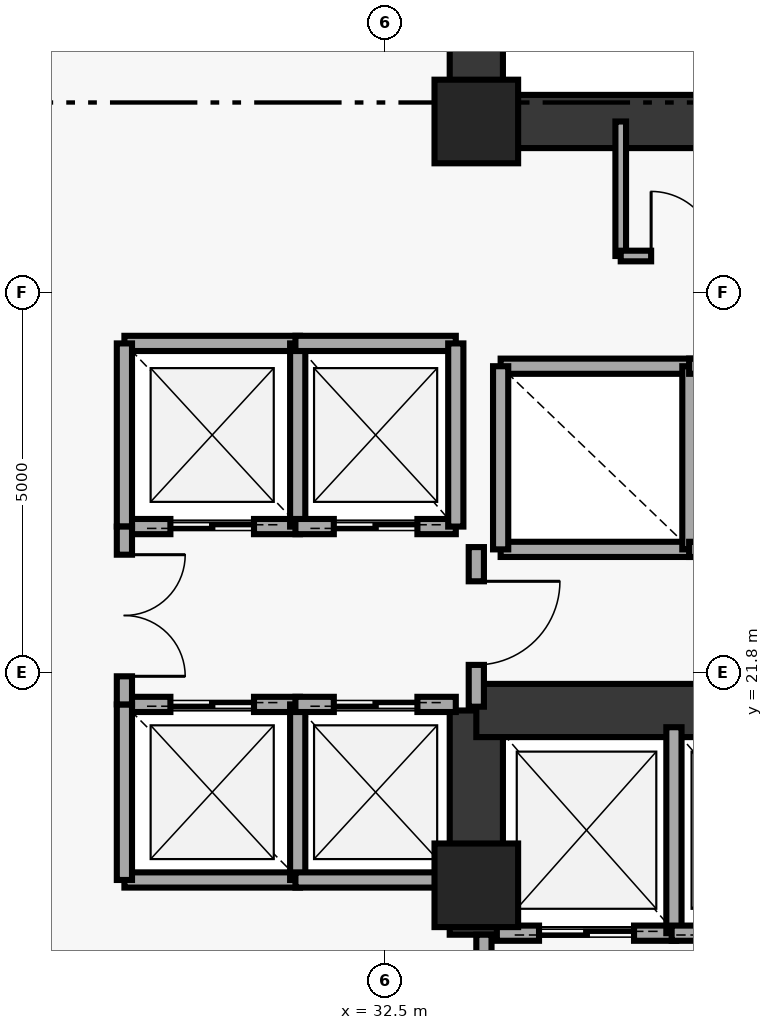
"""IFC4 building model, lengths in metres.
Left out: names, types, materials, properties, quantities, classifications, styles, units other than length and angle.
Written with IfcOpenShell. Run it as: python <this file> out.ifc"""

import sys

from ifc_helpers import new_model, si_unit, direction, frame, frame_2d, origin, origin_2d, place, context, subcontext, project, spatial, rectangle, extrude, element, fill, save


model = new_model("IFC4")
c1 = context("Model", 3, precision=1e-05, world=origin(), true_north=direction((0.0, 1.0)))
c2 = subcontext(c1, "Body", "Model", "MODEL_VIEW")
j1 = project(units=[si_unit("LENGTHUNIT", "METRE"), si_unit("PLANEANGLEUNIT", "RADIAN")], contexts=[c1])
p1 = place(None, origin())
s1 = spatial("IfcSite", under=j1, at=p1, CompositionType="ELEMENT")
p2 = place(p1, origin())
s2 = spatial("IfcBuilding", under=s1, at=p2, CompositionType="ELEMENT")
p3 = place(p2, frame((0.0, 0.0, 65.55)))
s3 = spatial("IfcBuildingStorey", under=s2, at=p3, CompositionType="ELEMENT", Elevation=65.55)
for number, where, z_axis, x_axis in (
    (1, (33.7, 19.0, 0.0), (0.0, 0.0, 1.0), (1.0, 0.0, 0.0)),
    (2, (33.7, 29.05, 0.0), (0.0, 0.0, 1.0), (1.0, 0.0, 0.0)),
):
    element("IfcColumn", number, at=place(p3, frame(where, z_axis=z_axis, x_axis=x_axis)), inside=s3, PredefinedType="PILASTER", context=c2, shape_type="SweptSolid", body=[
        extrude(rectangle(XDim=1.1, YDim=1.1, at=origin_2d()), origin(), (0.0, 0.0, 1.0), 3.8),
    ])
p4 = place(p3, frame((33.7, 29.05, 0.0), z_axis=(0.0, 0.0, 1.0), x_axis=(0.0, 1.0, 0.0)))
e3 = element("IfcWall", 3, at=p4, inside=s3, PredefinedType="SHEAR", context=c2, shape_type="SweptSolid", body=[
    extrude(rectangle(XDim=8.35, YDim=0.7, at=frame_2d((4.175, 0.0))), origin(), (0.0, 0.0, 1.0), 3.8),
])
p5 = place(p3, frame((33.7, 18.35, 0.0), z_axis=(0.0, 0.0, 1.0), x_axis=(0.0, 1.0, 0.0)))
e4 = element("IfcWall", 4, at=p5, inside=s3, PredefinedType="SHEAR", context=c2, shape_type="SweptSolid", body=[
    extrude(rectangle(XDim=2.95, YDim=0.7, at=frame_2d((1.475, 0.0))), origin(), (0.0, 0.0, 1.0), 3.8),
])
p6 = place(p3, frame((33.7, 29.05, 0.0), z_axis=(0.0, 0.0, 1.0), x_axis=(1.0, 0.0, 0.0)))
e5 = element("IfcWall", 5, at=p6, inside=s3, PredefinedType="SHEAR", context=c2, shape_type="SweptSolid", body=[
    extrude(rectangle(XDim=10.6, YDim=0.7, at=frame_2d((5.3, 0.0))), origin(), (0.0, 0.0, 1.0), 3.8),
])
p7 = place(p3, frame((33.7, 21.3, 0.0), z_axis=(0.0, 0.0, 1.0), x_axis=(1.0, 0.0, 0.0)))
e6 = element("IfcWall", 6, at=p7, inside=s3, PredefinedType="SHEAR", context=c2, shape_type="SweptSolid", body=[
    extrude(rectangle(XDim=7.55, YDim=0.7, at=frame_2d((3.775, 0.0))), origin(), (0.0, 0.0, 1.0), 3.8),
])
p8 = place(p3, frame((35.6, 27.28, 0.0), z_axis=(0.0, 0.0, 1.0), x_axis=(0.0, 1.0, 0.0)))
e7 = element("IfcWall", 7, at=p8, inside=s3, PredefinedType="PARTITIONING", context=c2, shape_type="SweptSolid", body=[
    extrude(rectangle(XDim=1.77, YDim=0.14, at=frame_2d((0.885, 0.0))), origin(), (0.0, 0.0, 1.0), 3.8),
])
p9 = place(p3, frame((29.07, 23.72, 0.0), z_axis=(0.0, 0.0, 1.0), x_axis=(1.0, 0.0, 0.0)))
e8 = element("IfcWall", 8, at=p9, inside=s3, PredefinedType="SOLIDWALL", context=c2, shape_type="SweptSolid", body=[
    extrude(rectangle(XDim=2.31, YDim=0.2, at=frame_2d((1.155, 0.0))), origin(), (0.0, 0.0, 1.0), 3.8),
])
p10 = place(p9, frame((0.605, 0.0, 0.0)))
e9 = element("IfcOpeningElement", 9, at=p10, cuts=e8, PredefinedType="OPENING", context=c2, shape_type="SweptSolid", body=[
    extrude(rectangle(XDim=1.1, YDim=2.15, at=frame_2d((0.55, 1.075))), frame((0.0, 0.11, 0.0), z_axis=(0.0, -1.0, 0.0), x_axis=(1.0, 0.0, 0.0)), (0.0, 0.0, 1.0), 0.22),
])
p11 = place(p3, frame((29.07, 26.13, 0.0), z_axis=(0.0, 0.0, 1.0), x_axis=(1.0, 0.0, 0.0)))
e10 = element("IfcWall", 10, at=p11, inside=s3, PredefinedType="SOLIDWALL", context=c2, shape_type="SweptSolid", body=[
    extrude(rectangle(XDim=2.31, YDim=0.2, at=frame_2d((1.155, 0.0))), origin(), (0.0, 0.0, 1.0), 3.8),
])
for number, where, z_axis, x_axis in (
    (11, (29.07, 23.72, 0.0), (0.0, 0.0, 1.0), (0.0, 1.0, 0.0)),
    (12, (31.35, 23.72, 0.0), (0.0, 0.0, 1.0), (0.0, 1.0, 0.0)),
):
    element("IfcWall", number, at=place(p3, frame(where, z_axis=z_axis, x_axis=x_axis)), inside=s3, PredefinedType="SOLIDWALL", context=c2, shape_type="SweptSolid", body=[
        extrude(rectangle(XDim=2.41, YDim=0.2, at=frame_2d((1.205, 0.0))), origin(), (0.0, 0.0, 1.0), 3.8),
    ])
p12 = place(p3, frame((31.32, 23.72, 0.0), z_axis=(0.0, 0.0, 1.0), x_axis=(1.0, 0.0, 0.0)))
e13 = element("IfcWall", 13, at=p12, inside=s3, PredefinedType="SOLIDWALL", context=c2, shape_type="SweptSolid", body=[
    extrude(rectangle(XDim=2.11, YDim=0.2, at=frame_2d((1.055, 0.0))), origin(), (0.0, 0.0, 1.0), 3.8),
])
p13 = place(p12, frame((0.505, 0.0, 0.0)))
e14 = element("IfcOpeningElement", 14, at=p13, cuts=e13, PredefinedType="OPENING", context=c2, shape_type="SweptSolid", body=[
    extrude(rectangle(XDim=1.1, YDim=2.15, at=frame_2d((0.55, 1.075))), frame((0.0, 0.11, 0.0), z_axis=(0.0, -1.0, 0.0), x_axis=(1.0, 0.0, 0.0)), (0.0, 0.0, 1.0), 0.22),
])
p14 = place(p3, frame((31.32, 26.13, 0.0), z_axis=(0.0, 0.0, 1.0), x_axis=(1.0, 0.0, 0.0)))
e15 = element("IfcWall", 15, at=p14, inside=s3, PredefinedType="SOLIDWALL", context=c2, shape_type="SweptSolid", body=[
    extrude(rectangle(XDim=2.11, YDim=0.2, at=frame_2d((1.055, 0.0))), origin(), (0.0, 0.0, 1.0), 3.8),
])
p15 = place(p3, frame((33.43, 23.72, 0.0), z_axis=(0.0, 0.0, 1.0), x_axis=(0.0, 1.0, 0.0)))
e16 = element("IfcWall", 16, at=p15, inside=s3, PredefinedType="SOLIDWALL", context=c2, shape_type="SweptSolid", body=[
    extrude(rectangle(XDim=2.41, YDim=0.2, at=frame_2d((1.205, 0.0))), origin(), (0.0, 0.0, 1.0), 3.8),
])
p16 = place(p3, frame((29.07, 19.07, 0.0), z_axis=(0.0, 0.0, 1.0), x_axis=(1.0, 0.0, 0.0)))
e17 = element("IfcWall", 17, at=p16, inside=s3, PredefinedType="SOLIDWALL", context=c2, shape_type="SweptSolid", body=[
    extrude(rectangle(XDim=2.31, YDim=0.2, at=frame_2d((1.155, 0.0))), origin(), (0.0, 0.0, 1.0), 3.8),
])
p17 = place(p3, frame((29.07, 21.38, 0.0), z_axis=(0.0, 0.0, 1.0), x_axis=(1.0, 0.0, 0.0)))
e18 = element("IfcWall", 18, at=p17, inside=s3, PredefinedType="SOLIDWALL", context=c2, shape_type="SweptSolid", body=[
    extrude(rectangle(XDim=2.31, YDim=0.2, at=frame_2d((1.155, 0.0))), origin(), (0.0, 0.0, 1.0), 3.8),
])
p18 = place(p17, frame((0.605, 0.0, 0.0)))
e19 = element("IfcOpeningElement", 19, at=p18, cuts=e18, PredefinedType="OPENING", context=c2, shape_type="SweptSolid", body=[
    extrude(rectangle(XDim=1.1, YDim=2.15, at=frame_2d((0.55, 1.075))), frame((0.0, 0.11, 0.0), z_axis=(0.0, -1.0, 0.0), x_axis=(1.0, 0.0, 0.0)), (0.0, 0.0, 1.0), 0.22),
])
for number, where, z_axis, x_axis in (
    (20, (29.07, 19.07, 0.0), (0.0, 0.0, 1.0), (0.0, 1.0, 0.0)),
    (21, (31.35, 19.07, 0.0), (0.0, 0.0, 1.0), (0.0, 1.0, 0.0)),
):
    element("IfcWall", number, at=place(p3, frame(where, z_axis=z_axis, x_axis=x_axis)), inside=s3, PredefinedType="SOLIDWALL", context=c2, shape_type="SweptSolid", body=[
        extrude(rectangle(XDim=2.31, YDim=0.2, at=frame_2d((1.155, 0.0))), origin(), (0.0, 0.0, 1.0), 3.8),
    ])
p19 = place(p3, frame((31.32, 19.07, 0.0), z_axis=(0.0, 0.0, 1.0), x_axis=(1.0, 0.0, 0.0)))
e22 = element("IfcWall", 22, at=p19, inside=s3, PredefinedType="SOLIDWALL", context=c2, shape_type="SweptSolid", body=[
    extrude(rectangle(XDim=2.11, YDim=0.2, at=frame_2d((1.055, 0.0))), origin(), (0.0, 0.0, 1.0), 3.8),
])
p20 = place(p3, frame((31.32, 21.38, 0.0), z_axis=(0.0, 0.0, 1.0), x_axis=(1.0, 0.0, 0.0)))
e23 = element("IfcWall", 23, at=p20, inside=s3, PredefinedType="SOLIDWALL", context=c2, shape_type="SweptSolid", body=[
    extrude(rectangle(XDim=2.11, YDim=0.2, at=frame_2d((1.055, 0.0))), origin(), (0.0, 0.0, 1.0), 3.8),
])
p21 = place(p20, frame((0.505, 0.0, 0.0)))
e24 = element("IfcOpeningElement", 24, at=p21, cuts=e23, PredefinedType="OPENING", context=c2, shape_type="SweptSolid", body=[
    extrude(rectangle(XDim=1.1, YDim=2.15, at=frame_2d((0.55, 1.075))), frame((0.0, 0.11, 0.0), z_axis=(0.0, -1.0, 0.0), x_axis=(1.0, 0.0, 0.0)), (0.0, 0.0, 1.0), 0.22),
])
for number, where, z_axis, x_axis in (
    (25, (34.02, 23.42, 0.0), (0.0, 0.0, 1.0), (1.0, 0.0, 0.0)),
    (26, (34.02, 25.83, 0.0), (0.0, 0.0, 1.0), (1.0, 0.0, 0.0)),
):
    element("IfcWall", number, at=place(p3, frame(where, z_axis=z_axis, x_axis=x_axis)), inside=s3, PredefinedType="SOLIDWALL", context=c2, shape_type="SweptSolid", body=[
        extrude(rectangle(XDim=2.5, YDim=0.2, at=frame_2d((1.25, 0.0))), origin(), (0.0, 0.0, 1.0), 3.8),
    ])
for number, where, z_axis, x_axis in (
    (27, (34.02, 23.42, 0.0), (0.0, 0.0, 1.0), (0.0, 1.0, 0.0)),
    (28, (36.51, 23.42, 0.0), (0.0, 0.0, 1.0), (0.0, 1.0, 0.0)),
):
    element("IfcWall", number, at=place(p3, frame(where, z_axis=z_axis, x_axis=x_axis)), inside=s3, PredefinedType="SOLIDWALL", context=c2, shape_type="SweptSolid", body=[
        extrude(rectangle(XDim=2.41, YDim=0.2, at=frame_2d((1.205, 0.0))), origin(), (0.0, 0.0, 1.0), 3.8),
    ])
for number, where, z_axis, x_axis in (
    (29, (36.5, 23.42, 0.0), (0.0, 0.0, 1.0), (1.0, 0.0, 0.0)),
    (30, (36.5, 25.83, 0.0), (0.0, 0.0, 1.0), (1.0, 0.0, 0.0)),
):
    element("IfcWall", number, at=place(p3, frame(where, z_axis=z_axis, x_axis=x_axis)), inside=s3, PredefinedType="SOLIDWALL", context=c2, shape_type="SweptSolid", body=[
        extrude(rectangle(XDim=2.5, YDim=0.2, at=frame_2d((1.25, 0.0))), origin(), (0.0, 0.0, 1.0), 3.8),
    ])
p22 = place(p3, frame((33.97, 18.37, 0.0), z_axis=(0.0, 0.0, 1.0), x_axis=(1.0, 0.0, 0.0)))
e31 = element("IfcWall", 31, at=p22, inside=s3, PredefinedType="SOLIDWALL", context=c2, shape_type="SweptSolid", body=[
    extrude(rectangle(XDim=2.36, YDim=0.2, at=frame_2d((1.18, 0.0))), origin(), (0.0, 0.0, 1.0), 3.8),
])
p23 = place(p22, frame((0.555, 0.0, 0.0)))
e32 = element("IfcOpeningElement", 32, at=p23, cuts=e31, PredefinedType="OPENING", context=c2, shape_type="SweptSolid", body=[
    extrude(rectangle(XDim=1.25, YDim=2.2, at=frame_2d((0.625, 1.1))), frame((0.0, 0.11, 0.0), z_axis=(0.0, -1.0, 0.0), x_axis=(1.0, 0.0, 0.0)), (0.0, 0.0, 1.0), 0.22),
])
p24 = place(p3, frame((36.3, 18.37, 0.0), z_axis=(0.0, 0.0, 1.0), x_axis=(0.0, 1.0, 0.0)))
e33 = element("IfcWall", 33, at=p24, inside=s3, PredefinedType="SOLIDWALL", context=c2, shape_type="SweptSolid", body=[
    extrude(rectangle(XDim=2.71, YDim=0.2, at=frame_2d((1.355, 0.0))), origin(), (0.0, 0.0, 1.0), 3.8),
])
p25 = place(p3, frame((36.27, 18.37, 0.0), z_axis=(0.0, 0.0, 1.0), x_axis=(1.0, 0.0, 0.0)))
e34 = element("IfcWall", 34, at=p25, inside=s3, PredefinedType="SOLIDWALL", context=c2, shape_type="SweptSolid", body=[
    extrude(rectangle(XDim=2.36, YDim=0.2, at=frame_2d((1.18, 0.0))), origin(), (0.0, 0.0, 1.0), 3.8),
])
p26 = place(p25, frame((0.38, 0.0, 0.0)))
e35 = element("IfcOpeningElement", 35, at=p26, cuts=e34, PredefinedType="OPENING", context=c2, shape_type="SweptSolid", body=[
    extrude(rectangle(XDim=1.25, YDim=2.2, at=frame_2d((0.625, 1.1))), frame((0.0, 0.11, 0.0), z_axis=(0.0, -1.0, 0.0), x_axis=(1.0, 0.0, 0.0)), (0.0, 0.0, 1.0), 0.22),
])
p27 = place(p3, frame((29.07, 21.38, 0.0), z_axis=(0.0, 0.0, 1.0), x_axis=(0.0, 1.0, 0.0)))
e36 = element("IfcWall", 36, at=p27, inside=s3, PredefinedType="SOLIDWALL", context=c2, shape_type="SweptSolid", body=[
    extrude(rectangle(XDim=2.34, YDim=0.2, at=frame_2d((1.17, 0.0))), origin(), (0.0, 0.0, 1.0), 3.8),
])
p28 = place(p27, frame((0.37, 0.0, 0.0)))
e37 = element("IfcOpeningElement", 37, at=p28, cuts=e36, PredefinedType="OPENING", context=c2, shape_type="SweptSolid", body=[
    extrude(rectangle(XDim=1.6, YDim=2.2, at=frame_2d((0.8, 1.1))), frame((0.0, 0.11, 0.0), z_axis=(0.0, -1.0, 0.0), x_axis=(1.0, 0.0, 0.0)), (0.0, 0.0, 1.0), 0.22),
])
p29 = place(p3, frame((33.7, 21.35, 0.0), z_axis=(0.0, 0.0, 1.0), x_axis=(0.0, 1.0, 0.0)))
e38 = element("IfcWall", 38, at=p29, inside=s3, PredefinedType="SOLIDWALL", context=c2, shape_type="SweptSolid", body=[
    extrude(rectangle(XDim=2.1, YDim=0.2, at=frame_2d((1.05, 0.0))), origin(), (0.0, 0.0, 1.0), 3.02),
])
p30 = place(p29, frame((0.55, 0.0, 0.0)))
e39 = element("IfcOpeningElement", 39, at=p30, cuts=e38, PredefinedType="OPENING", context=c2, shape_type="SweptSolid", body=[
    extrude(rectangle(XDim=1.1, YDim=2.15, at=frame_2d((0.55, 1.075))), frame((0.0, 0.11, 0.0), z_axis=(0.0, -1.0, 0.0), x_axis=(1.0, 0.0, 0.0)), (0.0, 0.0, 1.0), 0.22),
])
p31 = place(p3, frame((33.8, 15.55, 0.0), z_axis=(0.0, 0.0, 1.0), x_axis=(0.0, 1.0, 0.0)))
e40 = element("IfcWall", 40, at=p31, inside=s3, PredefinedType="SOLIDWALL", context=c2, shape_type="SweptSolid", body=[
    extrude(rectangle(XDim=2.8, YDim=0.2, at=frame_2d((1.4, 0.0))), origin(), (0.0, 0.0, 1.0), 3.8),
])
p32 = place(p3, frame((35.6, 27.28, 0.0), z_axis=(0.0, 0.0, 1.0), x_axis=(1.0, 0.0, 0.0)))
e41 = element("IfcWall", 41, at=p32, inside=s3, PredefinedType="PARTITIONING", context=c2, shape_type="SweptSolid", body=[
    extrude(rectangle(XDim=5.4, YDim=0.14, at=frame_2d((2.7, 0.0))), origin(), (0.0, 0.0, 1.0), 3.8),
])
p33 = place(p32, frame((0.4, 0.0, 0.0)))
e42 = element("IfcOpeningElement", 42, at=p33, cuts=e41, PredefinedType="OPENING", context=c2, shape_type="SweptSolid", body=[
    extrude(rectangle(XDim=0.85, YDim=2.1, at=frame_2d((0.425, 1.05))), frame((0.0, 0.08, 0.0), z_axis=(0.0, -1.0, 0.0), x_axis=(1.0, 0.0, 0.0)), (0.0, 0.0, 1.0), 0.16),
])
p34 = place(p32, frame((2.25, 0.0, 0.0)))
e43 = element("IfcOpeningElement", 43, at=p34, cuts=e41, PredefinedType="OPENING", context=c2, shape_type="SweptSolid", body=[
    extrude(rectangle(XDim=0.95, YDim=2.1, at=frame_2d((0.475, 1.05))), frame((0.0, 0.08, 0.0), z_axis=(0.0, -1.0, 0.0), x_axis=(1.0, 0.0, 0.0)), (0.0, 0.0, 1.0), 0.16),
])
p35 = place(p32, frame((4.2, 0.0, 0.0)))
e44 = element("IfcOpeningElement", 44, at=p35, cuts=e41, PredefinedType="OPENING", context=c2, shape_type="SweptSolid", body=[
    extrude(rectangle(XDim=0.8, YDim=2.05, at=frame_2d((0.4, 1.025))), frame((0.0, 0.08, 0.0), z_axis=(0.0, -1.0, 0.0), x_axis=(1.0, 0.0, 0.0)), (0.0, 0.0, 1.0), 0.16),
])
p36 = place(p3, frame((26.182, 18.255, 0.0), z_axis=(0.0, 0.0, 1.0), x_axis=(0.560652063277, -0.828051486288, 0.0)))
e45 = element("IfcWall", 45, at=p36, inside=s3, PredefinedType="PARTITIONING", context=c2, shape_type="SweptSolid", body=[
    extrude(rectangle(XDim=4.24, YDim=0.16, at=frame_2d((2.12, 0.0))), origin(), (0.0, 0.0, 1.0), 3.8),
])
p37 = place(p10, origin())
e46 = element("IfcDoor", 46, at=p37, inside=s3, OperationType="DOUBLE_DOOR_SLIDING", PredefinedType="DOOR", context=c2, shape_type="SweptSolid", body=[
    extrude(rectangle(XDim=1.1, YDim=2.15, at=frame_2d((0.55, 1.075))), frame((0.0, 0.025, 0.0), z_axis=(0.0, -1.0, 0.0), x_axis=(1.0, 0.0, 0.0)), (0.0, 0.0, 1.0), 0.05),
])
fill(e9, e46)
p38 = place(p13, origin())
e47 = element("IfcDoor", 47, at=p38, inside=s3, OperationType="DOUBLE_DOOR_SLIDING", PredefinedType="DOOR", context=c2, shape_type="SweptSolid", body=[
    extrude(rectangle(XDim=1.1, YDim=2.15, at=frame_2d((0.55, 1.075))), frame((0.0, 0.025, 0.0), z_axis=(0.0, -1.0, 0.0), x_axis=(1.0, 0.0, 0.0)), (0.0, 0.0, 1.0), 0.05),
])
fill(e14, e47)
p39 = place(p18, origin())
e48 = element("IfcDoor", 48, at=p39, inside=s3, OperationType="DOUBLE_DOOR_SLIDING", PredefinedType="DOOR", context=c2, shape_type="SweptSolid", body=[
    extrude(rectangle(XDim=1.1, YDim=2.15, at=frame_2d((0.55, 1.075))), frame((0.0, 0.025, 0.0), z_axis=(0.0, -1.0, 0.0), x_axis=(1.0, 0.0, 0.0)), (0.0, 0.0, 1.0), 0.05),
])
fill(e19, e48)
p40 = place(p21, origin())
e49 = element("IfcDoor", 49, at=p40, inside=s3, OperationType="DOUBLE_DOOR_SLIDING", PredefinedType="DOOR", context=c2, shape_type="SweptSolid", body=[
    extrude(rectangle(XDim=1.1, YDim=2.15, at=frame_2d((0.55, 1.075))), frame((0.0, 0.025, 0.0), z_axis=(0.0, -1.0, 0.0), x_axis=(1.0, 0.0, 0.0)), (0.0, 0.0, 1.0), 0.05),
])
fill(e24, e49)
p41 = place(p23, origin())
e50 = element("IfcDoor", 50, at=p41, inside=s3, OperationType="DOUBLE_DOOR_SLIDING", PredefinedType="DOOR", context=c2, shape_type="SweptSolid", body=[
    extrude(rectangle(XDim=1.25, YDim=2.2, at=frame_2d((0.625, 1.1))), frame((0.0, 0.025, 0.0), z_axis=(0.0, -1.0, 0.0), x_axis=(1.0, 0.0, 0.0)), (0.0, 0.0, 1.0), 0.05),
])
fill(e32, e50)
p42 = place(p28, origin())
e51 = element("IfcDoor", 51, at=p42, inside=s3, OperationType="DOUBLE_DOOR_SINGLE_SWING", PredefinedType="DOOR", context=c2, shape_type="SweptSolid", body=[
    extrude(rectangle(XDim=1.6, YDim=2.2, at=frame_2d((0.8, 1.1))), frame((0.0, 0.025, 0.0), z_axis=(0.0, -1.0, 0.0), x_axis=(1.0, 0.0, 0.0)), (0.0, 0.0, 1.0), 0.05),
])
fill(e37, e51)
p43 = place(p30, origin())
e52 = element("IfcDoor", 52, at=p43, inside=s3, OperationType="SINGLE_SWING_RIGHT", PredefinedType="DOOR", context=c2, shape_type="SweptSolid", body=[
    extrude(rectangle(XDim=1.1, YDim=2.15, at=frame_2d((0.55, 1.075))), frame((0.0, 0.025, 0.0), z_axis=(0.0, -1.0, 0.0), x_axis=(1.0, 0.0, 0.0)), (0.0, 0.0, 1.0), 0.05),
])
fill(e39, e52)
p44 = place(p33, origin())
e53 = element("IfcDoor", 53, at=p44, inside=s3, OperationType="SINGLE_SWING_LEFT", PredefinedType="DOOR", context=c2, shape_type="SweptSolid", body=[
    extrude(rectangle(XDim=0.85, YDim=2.1, at=frame_2d((0.425, 1.05))), frame((0.0, 0.025, 0.0), z_axis=(0.0, -1.0, 0.0), x_axis=(1.0, 0.0, 0.0)), (0.0, 0.0, 1.0), 0.05),
])
fill(e42, e53)
save(model, sys.argv[1])
